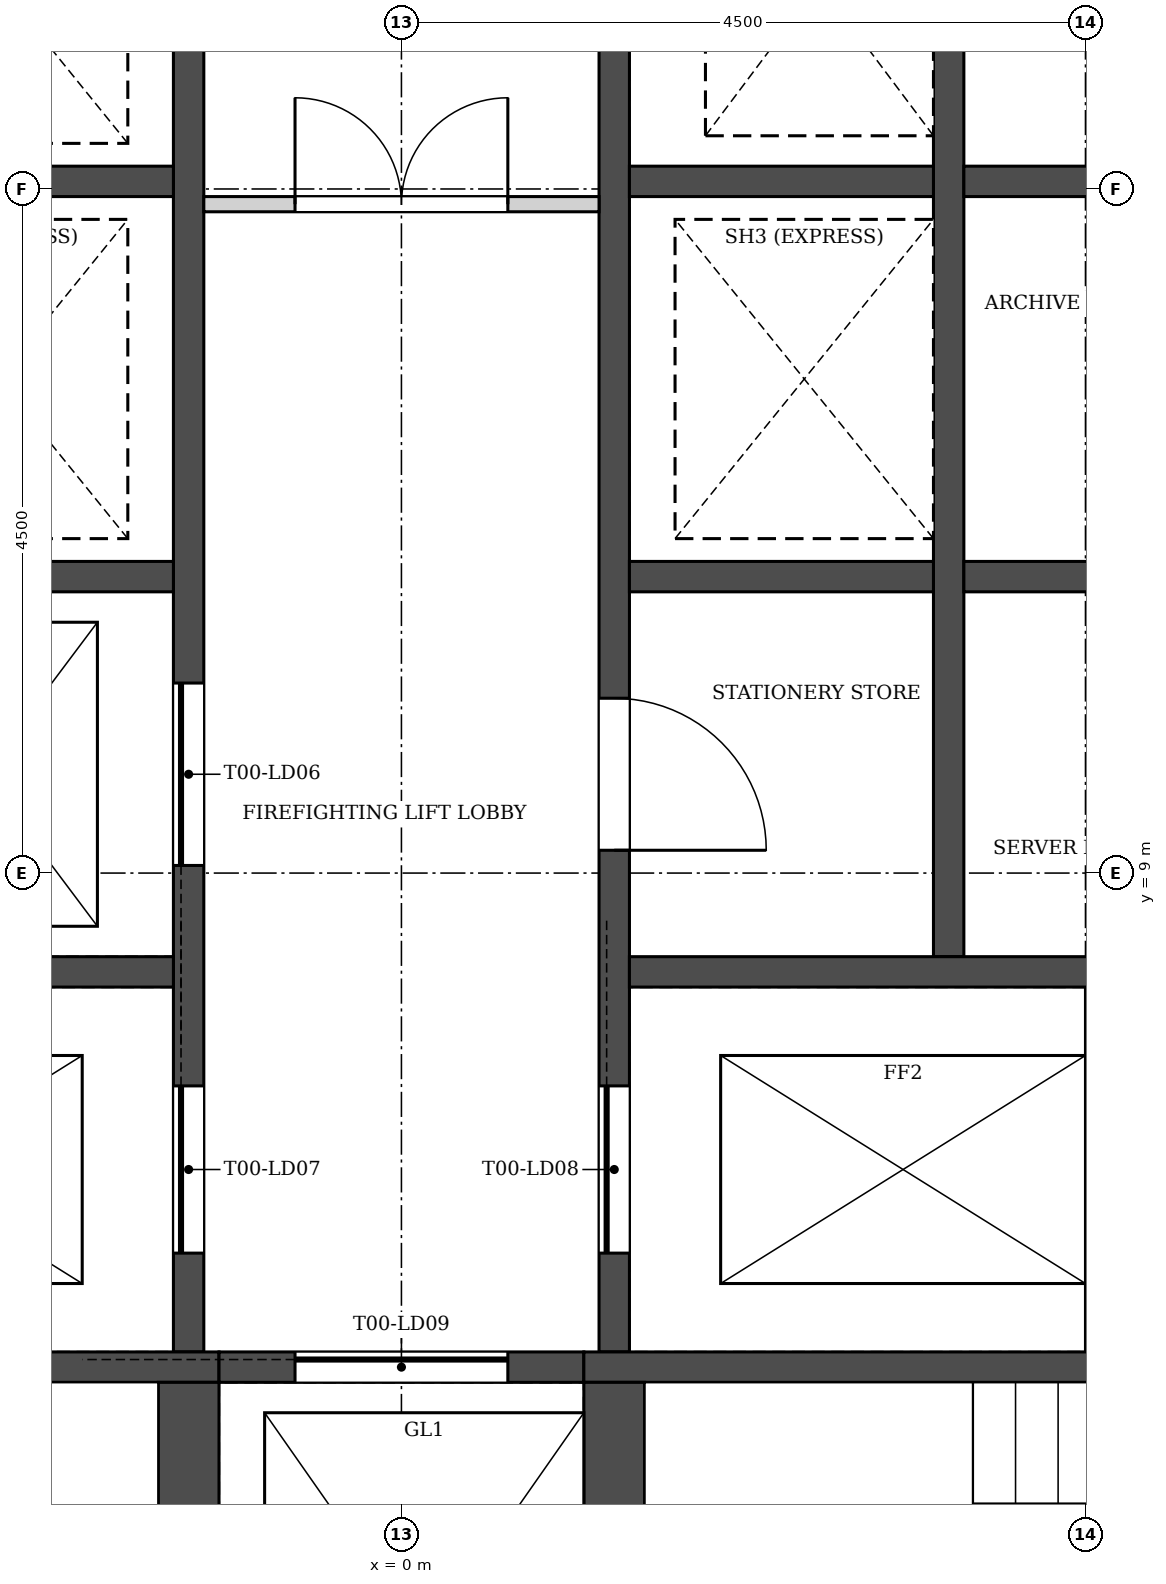
"""IFC4 building model, lengths in metres.
Left out: names, types, materials, properties, quantities, classifications, styles, units other than length and angle.
Written with IfcOpenShell. Run it as: python <this file> out.ifc"""

import sys

from ifc_helpers import new_model, si_unit, direction, frame, frame_2d, origin, place, context, subcontext, project, spatial, rectangle, extrude, element, fill, save


model = new_model("IFC4")
c1 = context("Model", 3, precision=1e-05, world=origin(), true_north=direction((0.0, 1.0)))
c2 = subcontext(c1, "Body", "Model", "MODEL_VIEW")
j1 = project(units=[si_unit("LENGTHUNIT", "METRE"), si_unit("PLANEANGLEUNIT", "RADIAN")], contexts=[c1])
p1 = place(None, origin())
s1 = spatial("IfcSite", under=j1, at=p1, CompositionType="ELEMENT")
p2 = place(p1, origin())
s2 = spatial("IfcBuilding", under=s1, at=p2, CompositionType="ELEMENT")
p3 = place(p2, frame((0.0, 0.0, 25.0)))
s3 = spatial("IfcBuildingStorey", under=s2, at=p3, CompositionType="ELEMENT", Elevation=25.0)
p4 = place(p3, frame((32.353, 7.709, 0.0), z_axis=(0.0, 0.0, 1.0), x_axis=(-0.500000836325, 0.866024920931, 0.0)))
e1 = element("IfcWall", 1, at=p4, inside=s3, PredefinedType="SOLIDWALL", context=c2, shape_type="SweptSolid", body=[
    extrude(rectangle(XDim=56.0, YDim=0.34, at=frame_2d((28.0, 0.0))), origin(), (0.0, 0.0, 1.0), 4.2),
])
p5 = place(p4, frame((1.5, 0.0, 0.9)))
e2 = element("IfcOpeningElement", 2, at=p5, cuts=e1, PredefinedType="OPENING", context=c2, shape_type="SweptSolid", body=[
    extrude(rectangle(XDim=1.885, YDim=3.0, at=frame_2d((0.942, 1.5))), frame((0.0, 0.18, 0.0), z_axis=(0.0, -1.0, 0.0), x_axis=(1.0, 0.0, 0.0)), (0.0, 0.0, 1.0), 0.36),
])
p6 = place(p4, frame((4.5, 0.0, 0.9)))
e3 = element("IfcOpeningElement", 3, at=p6, cuts=e1, PredefinedType="OPENING", context=c2, shape_type="SweptSolid", body=[
    extrude(rectangle(XDim=1.885, YDim=3.0, at=frame_2d((0.942, 1.5))), frame((0.0, 0.18, 0.0), z_axis=(0.0, -1.0, 0.0), x_axis=(1.0, 0.0, 0.0)), (0.0, 0.0, 1.0), 0.36),
])
p7 = place(p4, frame((7.5, 0.0, 0.9)))
e4 = element("IfcOpeningElement", 4, at=p7, cuts=e1, PredefinedType="OPENING", context=c2, shape_type="SweptSolid", body=[
    extrude(rectangle(XDim=1.885, YDim=3.0, at=frame_2d((0.942, 1.5))), frame((0.0, 0.18, 0.0), z_axis=(0.0, -1.0, 0.0), x_axis=(1.0, 0.0, 0.0)), (0.0, 0.0, 1.0), 0.36),
])
p8 = place(p4, frame((10.5, 0.0, 0.9)))
e5 = element("IfcOpeningElement", 5, at=p8, cuts=e1, PredefinedType="OPENING", context=c2, shape_type="SweptSolid", body=[
    extrude(rectangle(XDim=1.885, YDim=3.0, at=frame_2d((0.942, 1.5))), frame((0.0, 0.18, 0.0), z_axis=(0.0, -1.0, 0.0), x_axis=(1.0, 0.0, 0.0)), (0.0, 0.0, 1.0), 0.36),
])
p9 = place(p4, frame((13.5, 0.0, 0.9)))
e6 = element("IfcOpeningElement", 6, at=p9, cuts=e1, PredefinedType="OPENING", context=c2, shape_type="SweptSolid", body=[
    extrude(rectangle(XDim=1.885, YDim=3.0, at=frame_2d((0.942, 1.5))), frame((0.0, 0.18, 0.0), z_axis=(0.0, -1.0, 0.0), x_axis=(1.0, 0.0, 0.0)), (0.0, 0.0, 1.0), 0.36),
])
p10 = place(p4, frame((16.5, 0.0, 0.9)))
e7 = element("IfcOpeningElement", 7, at=p10, cuts=e1, PredefinedType="OPENING", context=c2, shape_type="SweptSolid", body=[
    extrude(rectangle(XDim=1.885, YDim=3.0, at=frame_2d((0.942, 1.5))), frame((0.0, 0.18, 0.0), z_axis=(0.0, -1.0, 0.0), x_axis=(1.0, 0.0, 0.0)), (0.0, 0.0, 1.0), 0.36),
])
p11 = place(p4, frame((19.5, 0.0, 0.9)))
e8 = element("IfcOpeningElement", 8, at=p11, cuts=e1, PredefinedType="OPENING", context=c2, shape_type="SweptSolid", body=[
    extrude(rectangle(XDim=1.885, YDim=3.0, at=frame_2d((0.942, 1.5))), frame((0.0, 0.18, 0.0), z_axis=(0.0, -1.0, 0.0), x_axis=(1.0, 0.0, 0.0)), (0.0, 0.0, 1.0), 0.36),
])
p12 = place(p4, frame((22.5, 0.0, 0.9)))
e9 = element("IfcOpeningElement", 9, at=p12, cuts=e1, PredefinedType="OPENING", context=c2, shape_type="SweptSolid", body=[
    extrude(rectangle(XDim=1.885, YDim=3.0, at=frame_2d((0.942, 1.5))), frame((0.0, 0.18, 0.0), z_axis=(0.0, -1.0, 0.0), x_axis=(1.0, 0.0, 0.0)), (0.0, 0.0, 1.0), 0.36),
])
p13 = place(p4, frame((25.5, 0.0, 0.9)))
e10 = element("IfcOpeningElement", 10, at=p13, cuts=e1, PredefinedType="OPENING", context=c2, shape_type="SweptSolid", body=[
    extrude(rectangle(XDim=1.885, YDim=3.0, at=frame_2d((0.942, 1.5))), frame((0.0, 0.18, 0.0), z_axis=(0.0, -1.0, 0.0), x_axis=(1.0, 0.0, 0.0)), (0.0, 0.0, 1.0), 0.36),
])
p14 = place(p4, frame((28.5, 0.0, 0.9)))
e11 = element("IfcOpeningElement", 11, at=p14, cuts=e1, PredefinedType="OPENING", context=c2, shape_type="SweptSolid", body=[
    extrude(rectangle(XDim=1.885, YDim=3.0, at=frame_2d((0.942, 1.5))), frame((0.0, 0.18, 0.0), z_axis=(0.0, -1.0, 0.0), x_axis=(1.0, 0.0, 0.0)), (0.0, 0.0, 1.0), 0.36),
])
p15 = place(p4, frame((31.5, 0.0, 0.0)))
e12 = element("IfcOpeningElement", 12, at=p15, cuts=e1, PredefinedType="OPENING", context=c2, shape_type="SweptSolid", body=[
    extrude(rectangle(XDim=1.885, YDim=2.6, at=frame_2d((0.942, 1.3))), frame((0.0, 0.18, 0.0), z_axis=(0.0, -1.0, 0.0), x_axis=(1.0, 0.0, 0.0)), (0.0, 0.0, 1.0), 0.36),
])
p16 = place(p4, frame((34.5, 0.0, 0.9)))
e13 = element("IfcOpeningElement", 13, at=p16, cuts=e1, PredefinedType="OPENING", context=c2, shape_type="SweptSolid", body=[
    extrude(rectangle(XDim=1.885, YDim=3.0, at=frame_2d((0.942, 1.5))), frame((0.0, 0.18, 0.0), z_axis=(0.0, -1.0, 0.0), x_axis=(1.0, 0.0, 0.0)), (0.0, 0.0, 1.0), 0.36),
])
p17 = place(p4, frame((37.5, 0.0, 0.9)))
e14 = element("IfcOpeningElement", 14, at=p17, cuts=e1, PredefinedType="OPENING", context=c2, shape_type="SweptSolid", body=[
    extrude(rectangle(XDim=1.885, YDim=3.0, at=frame_2d((0.942, 1.5))), frame((0.0, 0.18, 0.0), z_axis=(0.0, -1.0, 0.0), x_axis=(1.0, 0.0, 0.0)), (0.0, 0.0, 1.0), 0.36),
])
p18 = place(p4, frame((40.5, 0.0, 0.9)))
e15 = element("IfcOpeningElement", 15, at=p18, cuts=e1, PredefinedType="OPENING", context=c2, shape_type="SweptSolid", body=[
    extrude(rectangle(XDim=1.885, YDim=3.0, at=frame_2d((0.942, 1.5))), frame((0.0, 0.18, 0.0), z_axis=(0.0, -1.0, 0.0), x_axis=(1.0, 0.0, 0.0)), (0.0, 0.0, 1.0), 0.36),
])
p19 = place(p4, frame((43.5, 0.0, 0.9)))
e16 = element("IfcOpeningElement", 16, at=p19, cuts=e1, PredefinedType="OPENING", context=c2, shape_type="SweptSolid", body=[
    extrude(rectangle(XDim=1.885, YDim=3.0, at=frame_2d((0.942, 1.5))), frame((0.0, 0.18, 0.0), z_axis=(0.0, -1.0, 0.0), x_axis=(1.0, 0.0, 0.0)), (0.0, 0.0, 1.0), 0.36),
])
p20 = place(p4, frame((46.5, 0.0, 0.9)))
e17 = element("IfcOpeningElement", 17, at=p20, cuts=e1, PredefinedType="OPENING", context=c2, shape_type="SweptSolid", body=[
    extrude(rectangle(XDim=1.885, YDim=3.0, at=frame_2d((0.942, 1.5))), frame((0.0, 0.18, 0.0), z_axis=(0.0, -1.0, 0.0), x_axis=(1.0, 0.0, 0.0)), (0.0, 0.0, 1.0), 0.36),
])
p21 = place(p4, frame((49.5, 0.0, 0.9)))
e18 = element("IfcOpeningElement", 18, at=p21, cuts=e1, PredefinedType="OPENING", context=c2, shape_type="SweptSolid", body=[
    extrude(rectangle(XDim=1.885, YDim=3.0, at=frame_2d((0.942, 1.5))), frame((0.0, 0.18, 0.0), z_axis=(0.0, -1.0, 0.0), x_axis=(1.0, 0.0, 0.0)), (0.0, 0.0, 1.0), 0.36),
])
p22 = place(p4, frame((52.5, 0.0, 0.9)))
e19 = element("IfcOpeningElement", 19, at=p22, cuts=e1, PredefinedType="OPENING", context=c2, shape_type="SweptSolid", body=[
    extrude(rectangle(XDim=1.885, YDim=3.0, at=frame_2d((0.942, 1.5))), frame((0.0, 0.18, 0.0), z_axis=(0.0, -1.0, 0.0), x_axis=(1.0, 0.0, 0.0)), (0.0, 0.0, 1.0), 0.36),
])
p23 = place(p3, frame((3.6, 8.45, -2.0), z_axis=(0.0, 0.0, 1.0), x_axis=(0.0, 1.0, 0.0)))
e20 = element("IfcWall", 20, at=p23, inside=s3, PredefinedType="SOLIDWALL", context=c2, shape_type="SweptSolid", body=[
    extrude(rectangle(XDim=7.8, YDim=0.2, at=frame_2d((3.9, 0.0))), origin(), (0.0, 0.0, 1.0), 6.2),
])
p24 = place(p3, frame((-1.4, 5.85, -2.0), z_axis=(0.0, 0.0, 1.0), x_axis=(0.0, 1.0, 0.0)))
e21 = element("IfcWall", 21, at=p24, inside=s3, PredefinedType="SOLIDWALL", context=c2, shape_type="SweptSolid", body=[
    extrude(rectangle(XDim=11.75, YDim=0.2, at=frame_2d((5.875, 0.0))), origin(), (0.0, 0.0, 1.0), 6.2),
])
p25 = place(p24, frame((3.2, 0.0, 2.0)))
e22 = element("IfcOpeningElement", 22, at=p25, cuts=e21, PredefinedType="OPENING", context=c2, shape_type="SweptSolid", body=[
    extrude(rectangle(XDim=1.2, YDim=2.1, at=frame_2d((0.6, 1.05))), frame((0.0, 0.11, 0.0), z_axis=(0.0, -1.0, 0.0), x_axis=(1.0, 0.0, 0.0)), (0.0, 0.0, 1.0), 0.22),
])
p26 = place(p24, frame((0.65, 0.0, 2.0)))
e23 = element("IfcOpeningElement", 23, at=p26, cuts=e21, PredefinedType="OPENING", context=c2, shape_type="SweptSolid", body=[
    extrude(rectangle(XDim=1.1, YDim=2.1, at=frame_2d((0.55, 1.05))), frame((0.0, 0.11, 0.0), z_axis=(0.0, -1.0, 0.0), x_axis=(1.0, 0.0, 0.0)), (0.0, 0.0, 1.0), 0.22),
])
p27 = place(p3, frame((1.4, 5.85, -2.0), z_axis=(0.0, 0.0, 1.0), x_axis=(0.0, 1.0, 0.0)))
e24 = element("IfcWall", 24, at=p27, inside=s3, PredefinedType="SOLIDWALL", context=c2, shape_type="SweptSolid", body=[
    extrude(rectangle(XDim=11.75, YDim=0.2, at=frame_2d((5.875, 0.0))), origin(), (0.0, 0.0, 1.0), 6.2),
])
p28 = place(p27, frame((0.65, 0.0, 2.0)))
e25 = element("IfcOpeningElement", 25, at=p28, cuts=e24, PredefinedType="OPENING", context=c2, shape_type="SweptSolid", body=[
    extrude(rectangle(XDim=1.1, YDim=2.1, at=frame_2d((0.55, 1.05))), frame((0.0, 0.11, 0.0), z_axis=(0.0, -1.0, 0.0), x_axis=(1.0, 0.0, 0.0)), (0.0, 0.0, 1.0), 0.22),
])
p29 = place(p27, frame((3.3, 0.0, 2.0)))
e26 = element("IfcOpeningElement", 26, at=p29, cuts=e24, PredefinedType="OPENING", context=c2, shape_type="SweptSolid", body=[
    extrude(rectangle(XDim=1.0, YDim=2.1, at=frame_2d((0.5, 1.05))), frame((0.0, 0.11, 0.0), z_axis=(0.0, -1.0, 0.0), x_axis=(1.0, 0.0, 0.0)), (0.0, 0.0, 1.0), 0.22),
])
for number, where, z_axis, x_axis in (
    (27, (-5.7, 8.35, -2.0), (0.0, 0.0, 1.0), (1.0, 0.0, 0.0)),
    (28, (1.5, 8.35, -2.0), (0.0, 0.0, 1.0), (1.0, 0.0, 0.0)),
):
    element("IfcWall", number, at=place(p3, frame(where, z_axis=z_axis, x_axis=x_axis)), inside=s3, PredefinedType="SOLIDWALL", context=c2, shape_type="SweptSolid", body=[
        extrude(rectangle(XDim=4.2, YDim=0.2, at=frame_2d((2.1, 0.0))), origin(), (0.0, 0.0, 1.0), 6.2),
    ])
p30 = place(p3, frame((-12.6, 5.75, -2.0), z_axis=(0.0, 0.0, 1.0), x_axis=(1.0, 0.0, 0.0)))
e29 = element("IfcWall", 29, at=p30, inside=s3, PredefinedType="SOLIDWALL", context=c2, shape_type="SweptSolid", body=[
    extrude(rectangle(XDim=11.4, YDim=0.2, at=frame_2d((5.7, 0.0))), origin(), (0.0, 0.0, 1.0), 6.2),
])
p31 = place(p3, frame((-1.2, 5.75, -2.0), z_axis=(0.0, 0.0, 1.0), x_axis=(1.0, 0.0, 0.0)))
e30 = element("IfcWall", 30, at=p31, inside=s3, PredefinedType="SOLIDWALL", context=c2, shape_type="SweptSolid", body=[
    extrude(rectangle(XDim=2.4, YDim=0.2, at=frame_2d((1.2, 0.0))), origin(), (0.0, 0.0, 1.0), 6.2),
])
p32 = place(p31, frame((0.5, 0.0, 2.0)))
e31 = element("IfcOpeningElement", 31, at=p32, cuts=e30, PredefinedType="OPENING", context=c2, shape_type="SweptSolid", body=[
    extrude(rectangle(XDim=1.4, YDim=2.1, at=frame_2d((0.7, 1.05))), frame((0.0, 0.11, 0.0), z_axis=(0.0, -1.0, 0.0), x_axis=(1.0, 0.0, 0.0)), (0.0, 0.0, 1.0), 0.22),
])
p33 = place(p3, frame((1.2, 5.75, -2.0), z_axis=(0.0, 0.0, 1.0), x_axis=(1.0, 0.0, 0.0)))
e32 = element("IfcWall", 32, at=p33, inside=s3, PredefinedType="SOLIDWALL", context=c2, shape_type="SweptSolid", body=[
    extrude(rectangle(XDim=11.4, YDim=0.2, at=frame_2d((5.7, 0.0))), origin(), (0.0, 0.0, 1.0), 6.2),
])
for number, where, z_axis, x_axis in (
    (33, (-1.4, 2.25, -2.0), (0.0, 0.0, 1.0), (0.0, 1.0, 0.0)),
    (34, (1.4, 2.25, -2.0), (0.0, 0.0, 1.0), (0.0, 1.0, 0.0)),
):
    element("IfcWall", number, at=place(p3, frame(where, z_axis=z_axis, x_axis=x_axis)), inside=s3, PredefinedType="SOLIDWALL", context=c2, shape_type="SweptSolid", body=[
        extrude(rectangle(XDim=3.4, YDim=0.4, at=frame_2d((1.7, 0.0))), origin(), (0.0, 0.0, 1.0), 6.2),
    ])
for number, where, z_axis, x_axis in (
    (35, (-3.5, 10.95, -2.0), (0.0, 0.0, 1.0), (1.0, 0.0, 0.0)),
    (36, (-3.5, 13.55, -2.0), (0.0, 0.0, 1.0), (1.0, 0.0, 0.0)),
    (37, (3.7, 10.95, -2.0), (0.0, 0.0, 1.0), (1.0, 0.0, 0.0)),
    (38, (3.7, 13.55, -2.0), (0.0, 0.0, 1.0), (1.0, 0.0, 0.0)),
    (39, (1.5, 10.95, -2.0), (0.0, 0.0, 1.0), (1.0, 0.0, 0.0)),
    (40, (1.5, 13.55, -2.0), (0.0, 0.0, 1.0), (1.0, 0.0, 0.0)),
):
    element("IfcWall", number, at=place(p3, frame(where, z_axis=z_axis, x_axis=x_axis)), inside=s3, PredefinedType="SOLIDWALL", context=c2, shape_type="SweptSolid", body=[
        extrude(rectangle(XDim=2.0, YDim=0.2, at=frame_2d((1.0, 0.0))), origin(), (0.0, 0.0, 1.0), 6.2),
    ])
p34 = place(p3, frame((-1.3, 13.4, 0.0), z_axis=(0.0, 0.0, 1.0), x_axis=(1.0, 0.0, 0.0)))
e41 = element("IfcWall", 41, at=p34, inside=s3, PredefinedType="PARTITIONING", context=c2, shape_type="SweptSolid", body=[
    extrude(rectangle(XDim=2.6, YDim=0.1, at=frame_2d((1.3, 0.0))), origin(), (0.0, 0.0, 1.0), 4.2),
])
p35 = place(p34, frame((0.6, 0.0, 0.0)))
e42 = element("IfcOpeningElement", 42, at=p35, cuts=e41, PredefinedType="OPENING", context=c2, shape_type="SweptSolid", body=[
    extrude(rectangle(XDim=1.4, YDim=2.1, at=frame_2d((0.7, 1.05))), frame((0.0, 0.06, 0.0), z_axis=(0.0, -1.0, 0.0), x_axis=(1.0, 0.0, 0.0)), (0.0, 0.0, 1.0), 0.12),
])
p36 = place(p25, origin())
e43 = element("IfcDoor", 43, at=p36, inside=s3, OperationType="SLIDING_TO_LEFT", PredefinedType="DOOR", context=c2, shape_type="SweptSolid", body=[
    extrude(rectangle(XDim=1.2, YDim=2.1, at=frame_2d((0.6, 1.05))), frame((0.0, 0.025, 0.0), z_axis=(0.0, -1.0, 0.0), x_axis=(1.0, 0.0, 0.0)), (0.0, 0.0, 1.0), 0.05),
])
fill(e22, e43)
p37 = place(p26, origin())
e44 = element("IfcDoor", 44, at=p37, inside=s3, OperationType="SLIDING_TO_RIGHT", PredefinedType="DOOR", context=c2, shape_type="SweptSolid", body=[
    extrude(rectangle(XDim=1.1, YDim=2.1, at=frame_2d((0.55, 1.05))), frame((0.0, 0.025, 0.0), z_axis=(0.0, -1.0, 0.0), x_axis=(1.0, 0.0, 0.0)), (0.0, 0.0, 1.0), 0.05),
])
fill(e23, e44)
p38 = place(p28, origin())
e45 = element("IfcDoor", 45, at=p38, inside=s3, OperationType="SLIDING_TO_RIGHT", PredefinedType="DOOR", context=c2, shape_type="SweptSolid", body=[
    extrude(rectangle(XDim=1.1, YDim=2.1, at=frame_2d((0.55, 1.05))), frame((0.0, 0.025, 0.0), z_axis=(0.0, -1.0, 0.0), x_axis=(1.0, 0.0, 0.0)), (0.0, 0.0, 1.0), 0.05),
])
fill(e25, e45)
p39 = place(p32, origin())
e46 = element("IfcDoor", 46, at=p39, inside=s3, OperationType="SLIDING_TO_LEFT", PredefinedType="DOOR", context=c2, shape_type="SweptSolid", body=[
    extrude(rectangle(XDim=1.4, YDim=2.1, at=frame_2d((0.7, 1.05))), frame((0.0, 0.025, 0.0), z_axis=(0.0, -1.0, 0.0), x_axis=(1.0, 0.0, 0.0)), (0.0, 0.0, 1.0), 0.05),
])
fill(e31, e46)
p40 = place(p29, frame((1.0, 0.0, 0.0), z_axis=(0.0, 0.0, 1.0), x_axis=(-1.0, 0.0, 0.0)))
e47 = element("IfcDoor", 47, at=p40, inside=s3, OperationType="SINGLE_SWING_RIGHT", PredefinedType="DOOR", context=c2, shape_type="SweptSolid", body=[
    extrude(rectangle(XDim=1.0, YDim=2.1, at=frame_2d((0.5, 1.05))), frame((0.0, 0.025, 0.0), z_axis=(0.0, -1.0, 0.0), x_axis=(1.0, 0.0, 0.0)), (0.0, 0.0, 1.0), 0.05),
])
fill(e26, e47)
p41 = place(p35, origin())
e48 = element("IfcDoor", 48, at=p41, inside=s3, OperationType="DOUBLE_DOOR_SINGLE_SWING", PredefinedType="DOOR", context=c2, shape_type="SweptSolid", body=[
    extrude(rectangle(XDim=1.4, YDim=2.1, at=frame_2d((0.7, 1.05))), frame((0.0, 0.025, 0.0), z_axis=(0.0, -1.0, 0.0), x_axis=(1.0, 0.0, 0.0)), (0.0, 0.0, 1.0), 0.05),
])
fill(e42, e48)
save(model, sys.argv[1])
